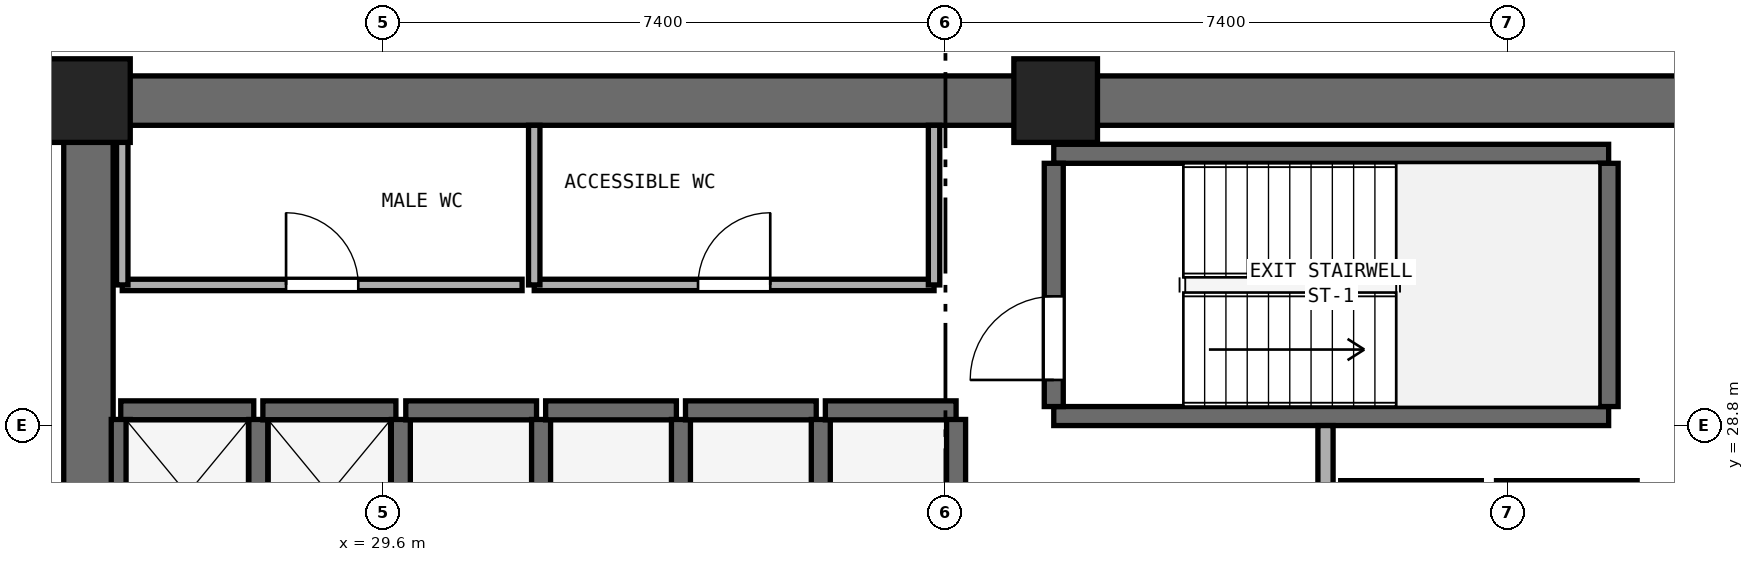
"""IFC4 building model, lengths in metres.
Left out: names, types, materials, properties, quantities, classifications, styles, units other than length and angle.
Written with IfcOpenShell. Run it as: python <this file> out.ifc"""

import sys

from ifc_helpers import new_model, si_unit, direction, frame, frame_2d, origin, origin_2d, place, context, subcontext, project, spatial, rectangle, extrude, element, fill, save


model = new_model("IFC4")
c1 = context("Model", 3, precision=1e-05, world=origin(), true_north=direction((0.0, 1.0)))
c2 = subcontext(c1, "Body", "Model", "MODEL_VIEW")
j1 = project(units=[si_unit("LENGTHUNIT", "METRE"), si_unit("PLANEANGLEUNIT", "RADIAN")], contexts=[c1])
p1 = place(None, origin())
s1 = spatial("IfcSite", under=j1, at=p1, CompositionType="ELEMENT")
p2 = place(p1, origin())
s2 = spatial("IfcBuilding", under=s1, at=p2, CompositionType="ELEMENT")
p3 = place(p2, frame((0.0, 0.0, 28.8)))
s3 = spatial("IfcBuildingStorey", under=s2, at=p3, CompositionType="ELEMENT", Elevation=28.8)
p4 = place(p3, frame((25.4, 33.075, 0.0), z_axis=(0.0, 0.0, 1.0), x_axis=(1.0, 0.0, 0.0)))
e1 = element("IfcWall", 1, at=p4, inside=s3, PredefinedType="SHEAR", context=c2, shape_type="SweptSolid", body=[
    extrude(rectangle(XDim=23.2, YDim=0.65, at=frame_2d((11.6, 0.0))), origin(), (0.0, 0.0, 1.0), 3.525),
])
p5 = place(p3, frame((25.725, 17.65, 0.0), z_axis=(0.0, 0.0, 1.0), x_axis=(0.0, 1.0, 0.0)))
e2 = element("IfcWall", 2, at=p5, inside=s3, PredefinedType="SHEAR", context=c2, shape_type="SweptSolid", body=[
    extrude(rectangle(XDim=15.1, YDim=0.65, at=frame_2d((7.55, 0.0))), origin(), (0.0, 0.0, 1.0), 3.525),
])
p6 = place(p5, frame((6.8, 0.0, 0.0)))
e3 = element("IfcOpeningElement", 3, at=p6, cuts=e2, PredefinedType="OPENING", context=c2, shape_type="SweptSolid", body=[
    extrude(rectangle(XDim=1.5, YDim=2.15, at=frame_2d((0.75, 1.075))), frame((0.0, 0.335, 0.0), z_axis=(0.0, -1.0, 0.0), x_axis=(1.0, 0.0, 0.0)), (0.0, 0.0, 1.0), 0.67),
])
for number, where, z_axis, x_axis in (
    (4, (38.45, 33.075, 0.0), (0.0, 0.0, 1.0), (1.0, 0.0, 0.0)),
    (5, (25.725, 33.075, 0.0), (0.0, 0.0, 1.0), (1.0, 0.0, 0.0)),
):
    element("IfcColumn", number, at=place(p3, frame(where, z_axis=z_axis, x_axis=x_axis)), inside=s3, PredefinedType="PILASTER", context=c2, shape_type="SweptSolid", body=[
        extrude(rectangle(XDim=1.1, YDim=1.1, at=origin_2d()), origin(), (0.0, 0.0, 1.0), 3.8),
    ])
for number, where, z_axis, x_axis in (
    (6, (38.425, 28.925, 0.0), (0.0, 0.0, 1.0), (1.0, 0.0, 0.0)),
    (7, (38.425, 32.375, 0.0), (0.0, 0.0, 1.0), (1.0, 0.0, 0.0)),
):
    element("IfcWall", number, at=place(p3, frame(where, z_axis=z_axis, x_axis=x_axis)), inside=s3, PredefinedType="SHEAR", context=c2, shape_type="SweptSolid", body=[
        extrude(rectangle(XDim=7.3, YDim=0.25, at=frame_2d((3.65, 0.0))), origin(), (0.0, 0.0, 1.0), 3.525),
    ])
p7 = place(p3, frame((38.425, 29.05, 0.0), z_axis=(0.0, 0.0, 1.0), x_axis=(0.0, 1.0, 0.0)))
e8 = element("IfcWall", 8, at=p7, inside=s3, PredefinedType="SHEAR", context=c2, shape_type="SweptSolid", body=[
    extrude(rectangle(XDim=3.2, YDim=0.25, at=frame_2d((1.6, 0.0))), origin(), (0.0, 0.0, 1.0), 3.525),
])
p8 = place(p7, frame((0.35, 0.0, 0.0)))
e9 = element("IfcOpeningElement", 9, at=p8, cuts=e8, PredefinedType="OPENING", context=c2, shape_type="SweptSolid", body=[
    extrude(rectangle(XDim=1.1, YDim=2.15, at=frame_2d((0.55, 1.075))), frame((0.0, 0.135, 0.0), z_axis=(0.0, -1.0, 0.0), x_axis=(1.0, 0.0, 0.0)), (0.0, 0.0, 1.0), 0.27),
])
p9 = place(p3, frame((45.725, 29.05, 0.0), z_axis=(0.0, 0.0, 1.0), x_axis=(0.0, 1.0, 0.0)))
e10 = element("IfcWall", 10, at=p9, inside=s3, PredefinedType="SHEAR", context=c2, shape_type="SweptSolid", body=[
    extrude(rectangle(XDim=3.2, YDim=0.25, at=frame_2d((1.6, 0.0))), origin(), (0.0, 0.0, 1.0), 3.525),
])
p10 = place(p3, frame((26.15, 29.0, 0.0), z_axis=(0.0, 0.0, 1.0), x_axis=(1.0, 0.0, 0.0)))
e11 = element("IfcWall", 11, at=p10, inside=s3, PredefinedType="SHEAR", context=c2, shape_type="SweptSolid", body=[
    extrude(rectangle(XDim=1.75, YDim=0.25, at=frame_2d((0.875, 0.0))), origin(), (0.0, 0.0, 1.0), 3.525),
])
for number, where, z_axis, x_axis in (
    (12, (26.15, 26.92, 0.0), (0.0, 0.0, 1.0), (0.0, 1.0, 0.0)),
    (13, (27.96, 26.92, 0.0), (0.0, 0.0, 1.0), (0.0, 1.0, 0.0)),
):
    element("IfcWall", number, at=place(p3, frame(where, z_axis=z_axis, x_axis=x_axis)), inside=s3, PredefinedType="SHEAR", context=c2, shape_type="SweptSolid", body=[
        extrude(rectangle(XDim=1.96, YDim=0.25, at=frame_2d((0.98, 0.0))), origin(), (0.0, 0.0, 1.0), 3.525),
    ])
p11 = place(p3, frame((28.02, 29.0, 0.0), z_axis=(0.0, 0.0, 1.0), x_axis=(1.0, 0.0, 0.0)))
e14 = element("IfcWall", 14, at=p11, inside=s3, PredefinedType="SHEAR", context=c2, shape_type="SweptSolid", body=[
    extrude(rectangle(XDim=1.75, YDim=0.25, at=frame_2d((0.875, 0.0))), origin(), (0.0, 0.0, 1.0), 3.525),
])
p12 = place(p3, frame((29.835, 26.92, 0.0), z_axis=(0.0, 0.0, 1.0), x_axis=(0.0, 1.0, 0.0)))
e15 = element("IfcWall", 15, at=p12, inside=s3, PredefinedType="SHEAR", context=c2, shape_type="SweptSolid", body=[
    extrude(rectangle(XDim=1.96, YDim=0.25, at=frame_2d((0.98, 0.0))), origin(), (0.0, 0.0, 1.0), 3.525),
])
p13 = place(p3, frame((29.9, 29.0, 0.0), z_axis=(0.0, 0.0, 1.0), x_axis=(1.0, 0.0, 0.0)))
e16 = element("IfcWall", 16, at=p13, inside=s3, PredefinedType="SHEAR", context=c2, shape_type="SweptSolid", body=[
    extrude(rectangle(XDim=1.72, YDim=0.25, at=frame_2d((0.86, 0.0))), origin(), (0.0, 0.0, 1.0), 3.525),
])
p14 = place(p3, frame((31.68, 26.92, 0.0), z_axis=(0.0, 0.0, 1.0), x_axis=(0.0, 1.0, 0.0)))
e17 = element("IfcWall", 17, at=p14, inside=s3, PredefinedType="SHEAR", context=c2, shape_type="SweptSolid", body=[
    extrude(rectangle(XDim=1.96, YDim=0.25, at=frame_2d((0.98, 0.0))), origin(), (0.0, 0.0, 1.0), 3.525),
])
p15 = place(p3, frame((31.74, 29.0, 0.0), z_axis=(0.0, 0.0, 1.0), x_axis=(1.0, 0.0, 0.0)))
e18 = element("IfcWall", 18, at=p15, inside=s3, PredefinedType="SHEAR", context=c2, shape_type="SweptSolid", body=[
    extrude(rectangle(XDim=1.72, YDim=0.25, at=frame_2d((0.86, 0.0))), origin(), (0.0, 0.0, 1.0), 3.525),
])
p16 = place(p3, frame((33.52, 26.92, 0.0), z_axis=(0.0, 0.0, 1.0), x_axis=(0.0, 1.0, 0.0)))
e19 = element("IfcWall", 19, at=p16, inside=s3, PredefinedType="SHEAR", context=c2, shape_type="SweptSolid", body=[
    extrude(rectangle(XDim=1.96, YDim=0.25, at=frame_2d((0.98, 0.0))), origin(), (0.0, 0.0, 1.0), 3.525),
])
p17 = place(p3, frame((33.58, 29.0, 0.0), z_axis=(0.0, 0.0, 1.0), x_axis=(1.0, 0.0, 0.0)))
e20 = element("IfcWall", 20, at=p17, inside=s3, PredefinedType="SHEAR", context=c2, shape_type="SweptSolid", body=[
    extrude(rectangle(XDim=1.72, YDim=0.25, at=frame_2d((0.86, 0.0))), origin(), (0.0, 0.0, 1.0), 3.525),
])
p18 = place(p3, frame((35.36, 26.92, 0.0), z_axis=(0.0, 0.0, 1.0), x_axis=(0.0, 1.0, 0.0)))
e21 = element("IfcWall", 21, at=p18, inside=s3, PredefinedType="SHEAR", context=c2, shape_type="SweptSolid", body=[
    extrude(rectangle(XDim=1.96, YDim=0.25, at=frame_2d((0.98, 0.0))), origin(), (0.0, 0.0, 1.0), 3.525),
])
p19 = place(p3, frame((35.42, 29.0, 0.0), z_axis=(0.0, 0.0, 1.0), x_axis=(1.0, 0.0, 0.0)))
e22 = element("IfcWall", 22, at=p19, inside=s3, PredefinedType="SHEAR", context=c2, shape_type="SweptSolid", body=[
    extrude(rectangle(XDim=1.72, YDim=0.25, at=frame_2d((0.86, 0.0))), origin(), (0.0, 0.0, 1.0), 3.525),
])
p20 = place(p3, frame((37.14, 26.92, 0.0), z_axis=(0.0, 0.0, 1.0), x_axis=(0.0, 1.0, 0.0)))
e23 = element("IfcWall", 23, at=p20, inside=s3, PredefinedType="SHEAR", context=c2, shape_type="SweptSolid", body=[
    extrude(rectangle(XDim=1.96, YDim=0.25, at=frame_2d((0.98, 0.0))), origin(), (0.0, 0.0, 1.0), 3.525),
])
for number, where, z_axis, x_axis in (
    (24, (42.2, 27.95, 0.0), (0.0, 0.0, 1.0), (1.0, 0.0, 0.0)),
    (25, (44.25, 27.95, 0.0), (0.0, 0.0, 1.0), (1.0, 0.0, 0.0)),
):
    element("IfcWall", number, at=place(p3, frame(where, z_axis=z_axis, x_axis=x_axis)), inside=s3, PredefinedType="SHEAR", context=c2, shape_type="SweptSolid", body=[
        extrude(rectangle(XDim=1.85, YDim=0.25, at=frame_2d((0.925, 0.0))), origin(), (0.0, 0.0, 1.0), 3.525),
    ])
p21 = place(p3, frame((42.0, 22.75, 0.0), z_axis=(0.0, 0.0, 1.0), x_axis=(0.0, 1.0, 0.0)))
e26 = element("IfcWall", 26, at=p21, inside=s3, PredefinedType="SOLIDWALL", context=c2, shape_type="SweptSolid", body=[
    extrude(rectangle(XDim=6.05, YDim=0.2, at=frame_2d((3.025, 0.0))), origin(), (0.0, 0.0, 1.0), 3.525),
])
p22 = place(p21, frame((0.65, 0.0, 0.0)))
e27 = element("IfcOpeningElement", 27, at=p22, cuts=e26, PredefinedType="OPENING", context=c2, shape_type="SweptSolid", body=[
    extrude(rectangle(XDim=1.2, YDim=2.15, at=frame_2d((0.6, 1.075))), frame((0.0, 0.11, 0.0), z_axis=(0.0, -1.0, 0.0), x_axis=(1.0, 0.0, 0.0)), (0.0, 0.0, 1.0), 0.22),
])
p23 = place(p3, frame((26.17, 30.65, 0.0), z_axis=(0.0, 0.0, 1.0), x_axis=(1.0, 0.0, 0.0)))
e28 = element("IfcWall", 28, at=p23, inside=s3, PredefinedType="PARTITIONING", context=c2, shape_type="SweptSolid", body=[
    extrude(rectangle(XDim=5.26, YDim=0.15, at=frame_2d((2.63, 0.0))), origin(), (0.0, 0.0, 1.0), 3.525),
])
p24 = place(p23, frame((2.155, 0.0, 0.0)))
e29 = element("IfcOpeningElement", 29, at=p24, cuts=e28, PredefinedType="OPENING", context=c2, shape_type="SweptSolid", body=[
    extrude(rectangle(XDim=0.95, YDim=2.1, at=frame_2d((0.475, 1.05))), frame((0.0, 0.085, 0.0), z_axis=(0.0, -1.0, 0.0), x_axis=(1.0, 0.0, 0.0)), (0.0, 0.0, 1.0), 0.17),
])
p25 = place(p3, frame((26.17, 30.65, 0.0), z_axis=(0.0, 0.0, 1.0), x_axis=(0.0, 1.0, 0.0)))
e30 = element("IfcWall", 30, at=p25, inside=s3, PredefinedType="PARTITIONING", context=c2, shape_type="SweptSolid", body=[
    extrude(rectangle(XDim=2.1, YDim=0.15, at=frame_2d((1.05, 0.0))), origin(), (0.0, 0.0, 1.0), 3.525),
])
p26 = place(p3, frame((31.59, 30.65, 0.0), z_axis=(0.0, 0.0, 1.0), x_axis=(1.0, 0.0, 0.0)))
e31 = element("IfcWall", 31, at=p26, inside=s3, PredefinedType="PARTITIONING", context=c2, shape_type="SweptSolid", body=[
    extrude(rectangle(XDim=5.26, YDim=0.15, at=frame_2d((2.63, 0.0))), origin(), (0.0, 0.0, 1.0), 3.525),
])
p27 = place(p26, frame((2.155, 0.0, 0.0)))
e32 = element("IfcOpeningElement", 32, at=p27, cuts=e31, PredefinedType="OPENING", context=c2, shape_type="SweptSolid", body=[
    extrude(rectangle(XDim=0.95, YDim=2.1, at=frame_2d((0.475, 1.05))), frame((0.0, 0.085, 0.0), z_axis=(0.0, -1.0, 0.0), x_axis=(1.0, 0.0, 0.0)), (0.0, 0.0, 1.0), 0.17),
])
for number, where, z_axis, x_axis in (
    (33, (31.59, 30.65, 0.0), (0.0, 0.0, 1.0), (0.0, 1.0, 0.0)),
    (34, (36.85, 30.65, 0.0), (0.0, 0.0, 1.0), (0.0, 1.0, 0.0)),
):
    element("IfcWall", number, at=place(p3, frame(where, z_axis=z_axis, x_axis=x_axis)), inside=s3, PredefinedType="PARTITIONING", context=c2, shape_type="SweptSolid", body=[
        extrude(rectangle(XDim=2.1, YDim=0.15, at=frame_2d((1.05, 0.0))), origin(), (0.0, 0.0, 1.0), 3.525),
    ])
p28 = place(p8, origin())
e35 = element("IfcDoor", 35, at=p28, inside=s3, OperationType="SINGLE_SWING_LEFT", PredefinedType="DOOR", context=c2, shape_type="SweptSolid", body=[
    extrude(rectangle(XDim=1.1, YDim=2.15, at=frame_2d((0.55, 1.075))), frame((0.0, 0.025, 0.0), z_axis=(0.0, -1.0, 0.0), x_axis=(1.0, 0.0, 0.0)), (0.0, 0.0, 1.0), 0.05),
])
fill(e9, e35)
p29 = place(p24, origin())
e36 = element("IfcDoor", 36, at=p29, inside=s3, OperationType="SINGLE_SWING_LEFT", PredefinedType="DOOR", context=c2, shape_type="SweptSolid", body=[
    extrude(rectangle(XDim=0.95, YDim=2.1, at=frame_2d((0.475, 1.05))), frame((0.0, 0.025, 0.0), z_axis=(0.0, -1.0, 0.0), x_axis=(1.0, 0.0, 0.0)), (0.0, 0.0, 1.0), 0.05),
])
fill(e29, e36)
p30 = place(p27, origin())
e37 = element("IfcDoor", 37, at=p30, inside=s3, OperationType="SINGLE_SWING_RIGHT", PredefinedType="DOOR", context=c2, shape_type="SweptSolid", body=[
    extrude(rectangle(XDim=0.95, YDim=2.1, at=frame_2d((0.475, 1.05))), frame((0.0, 0.025, 0.0), z_axis=(0.0, -1.0, 0.0), x_axis=(1.0, 0.0, 0.0)), (0.0, 0.0, 1.0), 0.05),
])
fill(e32, e37)
save(model, sys.argv[1])
